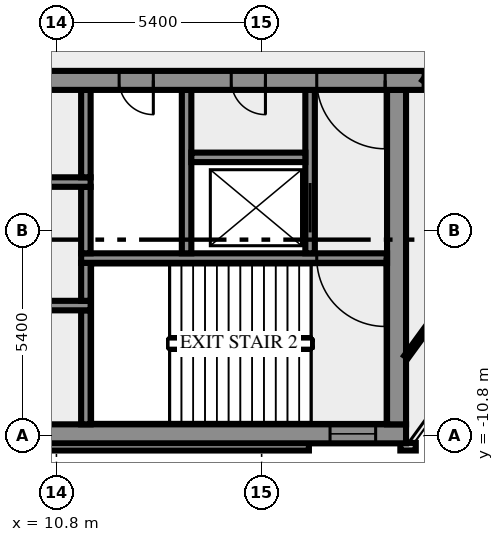
"""IFC4 building model, lengths in metres.
Left out: names, types, materials, properties, quantities, classifications, styles, units other than length and angle.
Written with IfcOpenShell. Run it as: python <this file> out.ifc"""

import sys

from ifc_helpers import new_model, si_unit, direction, frame, frame_2d, origin, place, context, subcontext, project, spatial, rectangle, extrude, element, fill, save


model = new_model("IFC4")
c1 = context("Model", 3, precision=1e-05, world=origin(), true_north=direction((0.0, 1.0)))
c2 = subcontext(c1, "Body", "Model", "MODEL_VIEW")
j1 = project(units=[si_unit("LENGTHUNIT", "METRE"), si_unit("PLANEANGLEUNIT", "RADIAN")], contexts=[c1])
p1 = place(None, origin())
s1 = spatial("IfcSite", under=j1, at=p1, CompositionType="ELEMENT")
p2 = place(p1, origin())
s2 = spatial("IfcBuilding", under=s1, at=p2, CompositionType="ELEMENT")
p3 = place(p2, frame((0.0, 0.0, 273.0)))
s3 = spatial("IfcBuildingStorey", under=s2, at=p3, CompositionType="ELEMENT", Elevation=273.0)
p4 = place(p3, frame((-17.444, -11.088, 0.0), z_axis=(0.0, 0.0, 1.0), x_axis=(1.0, 0.0, 0.0)))
e1 = element("IfcWall", 1, at=p4, inside=s3, PredefinedType="SOLIDWALL", context=c2, shape_type="SweptSolid", body=[
    extrude(rectangle(XDim=34.888, YDim=0.2, at=frame_2d((17.444, 0.0))), origin(), (0.0, 0.0, 1.0), 7.65),
])
p5 = place(p3, frame((19.85, -11.088, 0.0), z_axis=(0.0, 0.0, 1.0), x_axis=(1.0, 0.0, 0.0)))
e2 = element("IfcWall", 2, at=p5, inside=s3, PredefinedType="SOLIDWALL", context=c2, shape_type="SweptSolid", body=[
    extrude(rectangle(XDim=0.406, YDim=0.2, at=frame_2d((0.203, 0.0))), origin(), (0.0, 0.0, 1.0), 7.65),
])
p6 = place(p3, frame((-20.0, -10.75, 0.0), z_axis=(0.0, 0.0, 1.0), x_axis=(1.0, 0.0, 0.0)))
e3 = element("IfcWall", 3, at=p6, inside=s3, PredefinedType="SHEAR", context=c2, shape_type="SweptSolid", body=[
    extrude(rectangle(XDim=40.0, YDim=0.5, at=frame_2d((20.0, 0.0))), origin(), (0.0, 0.0, 1.0), 7.65),
])
p7 = place(p6, frame((0.8, 0.0, 1.0)))
e4 = element("IfcOpeningElement", 4, at=p7, cuts=e3, PredefinedType="OPENING", context=c2, shape_type="SweptSolid", body=[
    extrude(rectangle(XDim=1.2, YDim=1.2, at=frame_2d((0.6, 0.6))), frame((0.0, 0.26, 0.0), z_axis=(0.0, -1.0, 0.0), x_axis=(1.0, 0.0, 0.0)), (0.0, 0.0, 1.0), 0.52),
])
p8 = place(p6, frame((38.0, 0.0, 1.0)))
e5 = element("IfcOpeningElement", 5, at=p8, cuts=e3, PredefinedType="OPENING", context=c2, shape_type="SweptSolid", body=[
    extrude(rectangle(XDim=1.2, YDim=1.2, at=frame_2d((0.6, 0.6))), frame((0.0, 0.26, 0.0), z_axis=(0.0, -1.0, 0.0), x_axis=(1.0, 0.0, 0.0)), (0.0, 0.0, 1.0), 0.52),
])
p9 = place(p3, frame((11.575, -10.5, 0.0), z_axis=(0.0, 0.0, 1.0), x_axis=(0.0, 1.0, 0.0)))
e6 = element("IfcWall", 6, at=p9, inside=s3, PredefinedType="SHEAR", context=c2, shape_type="SweptSolid", body=[
    extrude(rectangle(XDim=3.0, YDim=0.25, at=frame_2d((1.5, 0.0))), origin(), (0.0, 0.0, 1.0), 7.65),
])
p10 = place(p3, frame((19.75, -10.5, 0.0), z_axis=(0.0, 0.0, 1.0), x_axis=(0.0, 1.0, 0.0)))
e7 = element("IfcWall", 7, at=p10, inside=s3, PredefinedType="SHEAR", context=c2, shape_type="SweptSolid", body=[
    extrude(rectangle(XDim=8.8, YDim=0.5, at=frame_2d((4.4, 0.0))), origin(), (0.0, 0.0, 1.0), 7.65),
])
p11 = place(p3, frame((11.7, -7.375, 0.0), z_axis=(0.0, 0.0, 1.0), x_axis=(-1.0, 0.0, 0.0)))
e8 = element("IfcWall", 8, at=p11, inside=s3, PredefinedType="SHEAR", context=c2, shape_type="SweptSolid", body=[
    extrude(rectangle(XDim=23.4, YDim=0.25, at=frame_2d((11.7, 0.0))), origin(), (0.0, 0.0, 1.0), 7.65),
])
p12 = place(p11, frame((14.5, 0.0, 0.0)))
e9 = element("IfcOpeningElement", 9, at=p12, cuts=e8, PredefinedType="OPENING", context=c2, shape_type="SweptSolid", body=[
    extrude(rectangle(XDim=0.9, YDim=2.1, at=frame_2d((0.45, 1.05))), frame((0.0, 0.135, 0.0), z_axis=(0.0, -1.0, 0.0), x_axis=(1.0, 0.0, 0.0)), (0.0, 0.0, 1.0), 0.27),
])
p13 = place(p11, frame((12.95, 0.0, 0.0)))
e10 = element("IfcOpeningElement", 10, at=p13, cuts=e8, PredefinedType="OPENING", context=c2, shape_type="SweptSolid", body=[
    extrude(rectangle(XDim=0.9, YDim=2.1, at=frame_2d((0.45, 1.05))), frame((0.0, 0.135, 0.0), z_axis=(0.0, -1.0, 0.0), x_axis=(1.0, 0.0, 0.0)), (0.0, 0.0, 1.0), 0.27),
])
p14 = place(p11, frame((10.95, 0.0, 0.0)))
e11 = element("IfcOpeningElement", 11, at=p14, cuts=e8, PredefinedType="OPENING", context=c2, shape_type="SweptSolid", body=[
    extrude(rectangle(XDim=0.9, YDim=2.1, at=frame_2d((0.45, 1.05))), frame((0.0, 0.135, 0.0), z_axis=(0.0, -1.0, 0.0), x_axis=(1.0, 0.0, 0.0)), (0.0, 0.0, 1.0), 0.27),
])
p15 = place(p11, frame((7.6, 0.0, 0.0)))
e12 = element("IfcOpeningElement", 12, at=p15, cuts=e8, PredefinedType="OPENING", context=c2, shape_type="SweptSolid", body=[
    extrude(rectangle(XDim=0.9, YDim=2.1, at=frame_2d((0.45, 1.05))), frame((0.0, 0.135, 0.0), z_axis=(0.0, -1.0, 0.0), x_axis=(1.0, 0.0, 0.0)), (0.0, 0.0, 1.0), 0.27),
])
p16 = place(p11, frame((2.338, 0.0, 0.0)))
e13 = element("IfcOpeningElement", 13, at=p16, cuts=e8, PredefinedType="OPENING", context=c2, shape_type="SweptSolid", body=[
    extrude(rectangle(XDim=0.9, YDim=2.1, at=frame_2d((0.45, 1.05))), frame((0.0, 0.135, 0.0), z_axis=(0.0, -1.0, 0.0), x_axis=(1.0, 0.0, 0.0)), (0.0, 0.0, 1.0), 0.27),
])
p17 = place(p3, frame((11.575, -7.25, 0.0), z_axis=(0.0, 0.0, 1.0), x_axis=(0.0, 1.0, 0.0)))
e14 = element("IfcWall", 14, at=p17, inside=s3, PredefinedType="SHEAR", context=c2, shape_type="SweptSolid", body=[
    extrude(rectangle(XDim=1.0, YDim=0.25, at=frame_2d((0.5, 0.0))), origin(), (0.0, 0.0, 1.0), 7.65),
])
p18 = place(p3, frame((19.5, -6.125, 0.0), z_axis=(0.0, 0.0, 1.0), x_axis=(-1.0, 0.0, 0.0)))
e15 = element("IfcWall", 15, at=p18, inside=s3, PredefinedType="SHEAR", context=c2, shape_type="SweptSolid", body=[
    extrude(rectangle(XDim=8.05, YDim=0.25, at=frame_2d((4.025, 0.0))), origin(), (0.0, 0.0, 1.0), 7.65),
])
p19 = place(p18, frame((0.05, 0.0, 0.0)))
e16 = element("IfcOpeningElement", 16, at=p19, cuts=e15, PredefinedType="OPENING", context=c2, shape_type="SweptSolid", body=[
    extrude(rectangle(XDim=1.8, YDim=2.1, at=frame_2d((0.9, 1.05))), frame((0.0, 0.135, 0.0), z_axis=(0.0, -1.0, 0.0), x_axis=(1.0, 0.0, 0.0)), (0.0, 0.0, 1.0), 0.27),
])
p20 = place(p3, frame((11.575, -6.0, 0.0), z_axis=(0.0, 0.0, 1.0), x_axis=(0.0, 1.0, 0.0)))
e17 = element("IfcWall", 17, at=p20, inside=s3, PredefinedType="SHEAR", context=c2, shape_type="SweptSolid", body=[
    extrude(rectangle(XDim=1.75, YDim=0.25, at=frame_2d((0.875, 0.0))), origin(), (0.0, 0.0, 1.0), 7.65),
])
p21 = place(p3, frame((14.225, -6.0, 0.0), z_axis=(0.0, 0.0, 1.0), x_axis=(0.0, 1.0, 0.0)))
e18 = element("IfcWall", 18, at=p21, inside=s3, PredefinedType="SHEAR", context=c2, shape_type="SweptSolid", body=[
    extrude(rectangle(XDim=4.3, YDim=0.25, at=frame_2d((2.15, 0.0))), origin(), (0.0, 0.0, 1.0), 7.65),
])
p22 = place(p3, frame((17.475, -6.0, 0.0), z_axis=(0.0, 0.0, 1.0), x_axis=(0.0, 1.0, 0.0)))
e19 = element("IfcWall", 19, at=p22, inside=s3, PredefinedType="SHEAR", context=c2, shape_type="SweptSolid", body=[
    extrude(rectangle(XDim=4.3, YDim=0.25, at=frame_2d((2.15, 0.0))), origin(), (0.0, 0.0, 1.0), 7.65),
])
p23 = place(p22, frame((0.55, 0.0, 0.0)))
e20 = element("IfcOpeningElement", 20, at=p23, cuts=e19, PredefinedType="OPENING", context=c2, shape_type="SweptSolid", body=[
    extrude(rectangle(XDim=1.3, YDim=2.1, at=frame_2d((0.65, 1.05))), frame((0.0, 0.135, 0.0), z_axis=(0.0, -1.0, 0.0), x_axis=(1.0, 0.0, 0.0)), (0.0, 0.0, 1.0), 0.27),
])
p24 = place(p3, frame((1.45, -4.125, 0.0), z_axis=(0.0, 0.0, 1.0), x_axis=(1.0, 0.0, 0.0)))
e21 = element("IfcWall", 21, at=p24, inside=s3, PredefinedType="SHEAR", context=c2, shape_type="SweptSolid", body=[
    extrude(rectangle(XDim=10.25, YDim=0.25, at=frame_2d((5.125, 0.0))), origin(), (0.0, 0.0, 1.0), 7.65),
])
p25 = place(p24, frame((0.7, 0.0, 0.0)))
e22 = element("IfcOpeningElement", 22, at=p25, cuts=e21, PredefinedType="OPENING", context=c2, shape_type="SweptSolid", body=[
    extrude(rectangle(XDim=1.3, YDim=2.1, at=frame_2d((0.65, 1.05))), frame((0.0, 0.135, 0.0), z_axis=(0.0, -1.0, 0.0), x_axis=(1.0, 0.0, 0.0)), (0.0, 0.0, 1.0), 0.27),
])
p26 = place(p3, frame((11.575, -4.0, 0.0), z_axis=(0.0, 0.0, 1.0), x_axis=(0.0, 1.0, 0.0)))
e23 = element("IfcWall", 23, at=p26, inside=s3, PredefinedType="SHEAR", context=c2, shape_type="SweptSolid", body=[
    extrude(rectangle(XDim=2.3, YDim=0.25, at=frame_2d((1.15, 0.0))), origin(), (0.0, 0.0, 1.0), 7.65),
])
p27 = place(p3, frame((14.35, -3.475, 0.0), z_axis=(0.0, 0.0, 1.0), x_axis=(1.0, 0.0, 0.0)))
e24 = element("IfcWall", 24, at=p27, inside=s3, PredefinedType="SHEAR", context=c2, shape_type="SweptSolid", body=[
    extrude(rectangle(XDim=3.0, YDim=0.25, at=frame_2d((1.5, 0.0))), origin(), (0.0, 0.0, 1.0), 7.65),
])
p28 = place(p3, frame((20.49, -1.45, 0.0), z_axis=(0.0, 0.0, 1.0), x_axis=(-1.0, 0.0, 0.0)))
e25 = element("IfcWall", 25, at=p28, inside=s3, PredefinedType="SHEAR", context=c2, shape_type="SweptSolid", body=[
    extrude(rectangle(XDim=40.98, YDim=0.5, at=frame_2d((20.49, 0.0))), origin(), (0.0, 0.0, 1.0), 7.65),
])
p29 = place(p28, frame((38.14, 0.0, 0.0)))
e26 = element("IfcOpeningElement", 26, at=p29, cuts=e25, PredefinedType="OPENING", context=c2, shape_type="SweptSolid", body=[
    extrude(rectangle(XDim=1.8, YDim=2.1, at=frame_2d((0.9, 1.05))), frame((0.0, 0.26, 0.0), z_axis=(0.0, -1.0, 0.0), x_axis=(1.0, 0.0, 0.0)), (0.0, 0.0, 1.0), 0.52),
])
p30 = place(p28, frame((36.728, 0.0, 0.0)))
e27 = element("IfcOpeningElement", 27, at=p30, cuts=e25, PredefinedType="OPENING", context=c2, shape_type="SweptSolid", body=[
    extrude(rectangle(XDim=0.8, YDim=2.1, at=frame_2d((0.4, 1.05))), frame((0.0, 0.26, 0.0), z_axis=(0.0, -1.0, 0.0), x_axis=(1.0, 0.0, 0.0)), (0.0, 0.0, 1.0), 0.52),
])
p31 = place(p28, frame((35.153, 0.0, 0.0)))
e28 = element("IfcOpeningElement", 28, at=p31, cuts=e25, PredefinedType="OPENING", context=c2, shape_type="SweptSolid", body=[
    extrude(rectangle(XDim=0.8, YDim=2.1, at=frame_2d((0.4, 1.05))), frame((0.0, 0.26, 0.0), z_axis=(0.0, -1.0, 0.0), x_axis=(1.0, 0.0, 0.0)), (0.0, 0.0, 1.0), 0.52),
])
p32 = place(p28, frame((32.94, 0.0, 0.0)))
e29 = element("IfcOpeningElement", 29, at=p32, cuts=e25, PredefinedType="OPENING", context=c2, shape_type="SweptSolid", body=[
    extrude(rectangle(XDim=0.9, YDim=2.1, at=frame_2d((0.45, 1.05))), frame((0.0, 0.26, 0.0), z_axis=(0.0, -1.0, 0.0), x_axis=(1.0, 0.0, 0.0)), (0.0, 0.0, 1.0), 0.52),
])
p33 = place(p28, frame((20.74, 0.0, 0.0)))
e30 = element("IfcOpeningElement", 30, at=p33, cuts=e25, PredefinedType="OPENING", context=c2, shape_type="SweptSolid", body=[
    extrude(rectangle(XDim=2.0, YDim=2.1, at=frame_2d((1.0, 1.05))), frame((0.0, 0.26, 0.0), z_axis=(0.0, -1.0, 0.0), x_axis=(1.0, 0.0, 0.0)), (0.0, 0.0, 1.0), 0.52),
])
p34 = place(p28, frame((14.903, 0.0, 0.0)))
e31 = element("IfcOpeningElement", 31, at=p34, cuts=e25, PredefinedType="OPENING", context=c2, shape_type="SweptSolid", body=[
    extrude(rectangle(XDim=0.9, YDim=2.1, at=frame_2d((0.45, 1.05))), frame((0.0, 0.26, 0.0), z_axis=(0.0, -1.0, 0.0), x_axis=(1.0, 0.0, 0.0)), (0.0, 0.0, 1.0), 0.52),
])
p35 = place(p28, frame((12.54, 0.0, 0.0)))
e32 = element("IfcOpeningElement", 32, at=p35, cuts=e25, PredefinedType="OPENING", context=c2, shape_type="SweptSolid", body=[
    extrude(rectangle(XDim=0.9, YDim=2.1, at=frame_2d((0.45, 1.05))), frame((0.0, 0.26, 0.0), z_axis=(0.0, -1.0, 0.0), x_axis=(1.0, 0.0, 0.0)), (0.0, 0.0, 1.0), 0.52),
])
p36 = place(p28, frame((9.877, 0.0, 0.0)))
e33 = element("IfcOpeningElement", 33, at=p36, cuts=e25, PredefinedType="OPENING", context=c2, shape_type="SweptSolid", body=[
    extrude(rectangle(XDim=0.9, YDim=2.1, at=frame_2d((0.45, 1.05))), frame((0.0, 0.26, 0.0), z_axis=(0.0, -1.0, 0.0), x_axis=(1.0, 0.0, 0.0)), (0.0, 0.0, 1.0), 0.52),
])
p37 = place(p28, frame((7.14, 0.0, 0.0)))
e34 = element("IfcOpeningElement", 34, at=p37, cuts=e25, PredefinedType="OPENING", context=c2, shape_type="SweptSolid", body=[
    extrude(rectangle(XDim=0.9, YDim=2.1, at=frame_2d((0.45, 1.05))), frame((0.0, 0.26, 0.0), z_axis=(0.0, -1.0, 0.0), x_axis=(1.0, 0.0, 0.0)), (0.0, 0.0, 1.0), 0.52),
])
p38 = place(p28, frame((4.19, 0.0, 0.0)))
e35 = element("IfcOpeningElement", 35, at=p38, cuts=e25, PredefinedType="OPENING", context=c2, shape_type="SweptSolid", body=[
    extrude(rectangle(XDim=0.9, YDim=2.1, at=frame_2d((0.45, 1.05))), frame((0.0, 0.26, 0.0), z_axis=(0.0, -1.0, 0.0), x_axis=(1.0, 0.0, 0.0)), (0.0, 0.0, 1.0), 0.52),
])
p39 = place(p28, frame((1.04, 0.0, 0.0)))
e36 = element("IfcOpeningElement", 36, at=p39, cuts=e25, PredefinedType="OPENING", context=c2, shape_type="SweptSolid", body=[
    extrude(rectangle(XDim=1.8, YDim=2.1, at=frame_2d((0.9, 1.05))), frame((0.0, 0.26, 0.0), z_axis=(0.0, -1.0, 0.0), x_axis=(1.0, 0.0, 0.0)), (0.0, 0.0, 1.0), 0.52),
])
p40 = place(p3, frame((33.12, 15.803, 0.0), z_axis=(0.0, 0.0, 1.0), x_axis=(-0.587781896694, -0.80901943235, 0.0)))
e37 = element("IfcWall", 37, at=p40, inside=s3, PredefinedType="SOLIDWALL", context=c2, shape_type="SweptSolid", body=[
    extrude(rectangle(XDim=21.417, YDim=0.25, at=frame_2d((10.708, 0.0))), origin(), (0.0, 0.0, 1.0), 7.65),
])
p41 = place(p40, frame((19.684, 0.0, 0.0)))
e38 = element("IfcOpeningElement", 38, at=p41, cuts=e37, PredefinedType="OPENING", context=c2, shape_type="SweptSolid", body=[
    extrude(rectangle(XDim=1.2, YDim=2.1, at=frame_2d((0.6, 1.05))), frame((0.0, 0.135, 0.0), z_axis=(0.0, -1.0, 0.0), x_axis=(1.0, 0.0, 0.0)), (0.0, 0.0, 1.0), 0.27),
])
p42 = place(p3, frame((20.0, -8.73, 0.0), z_axis=(0.0, 0.0, 1.0), x_axis=(0.588018712203, 0.808847324345, 0.0)))
e39 = element("IfcWall", 39, at=p42, inside=s3, PredefinedType="PARTITIONING", context=c2, shape_type="SweptSolid", body=[
    extrude(rectangle(XDim=1.708, YDim=0.12, at=frame_2d((0.854, 0.0))), origin(), (0.0, 0.0, 1.0), 7.65),
])
p43 = place(p8, origin())
e40 = element("IfcWindow", 40, at=p43, inside=s3, PartitioningType="SINGLE_PANEL", PredefinedType="WINDOW", context=c2, shape_type="SweptSolid", body=[
    extrude(rectangle(XDim=1.2, YDim=1.2, at=frame_2d((0.6, 0.6))), frame((0.0, 0.03, 0.0), z_axis=(0.0, -1.0, 0.0), x_axis=(1.0, 0.0, 0.0)), (0.0, 0.0, 1.0), 0.06),
])
fill(e5, e40)
p44 = place(p19, origin())
e41 = element("IfcDoor", 41, at=p44, inside=s3, OperationType="DOUBLE_DOOR_SINGLE_SWING", PredefinedType="DOOR", context=c2, shape_type="SweptSolid", body=[
    extrude(rectangle(XDim=1.8, YDim=2.1, at=frame_2d((0.9, 1.05))), frame((0.0, 0.025, 0.0), z_axis=(0.0, -1.0, 0.0), x_axis=(1.0, 0.0, 0.0)), (0.0, 0.0, 1.0), 0.05),
])
fill(e16, e41)
p45 = place(p23, origin())
e42 = element("IfcDoor", 42, at=p45, inside=s3, OperationType="DOUBLE_DOOR_SLIDING", PredefinedType="DOOR", context=c2, shape_type="SweptSolid", body=[
    extrude(rectangle(XDim=1.3, YDim=2.1, at=frame_2d((0.65, 1.05))), frame((0.0, 0.025, 0.0), z_axis=(0.0, -1.0, 0.0), x_axis=(1.0, 0.0, 0.0)), (0.0, 0.0, 1.0), 0.05),
])
fill(e20, e42)
p46 = place(p37, origin())
e43 = element("IfcDoor", 43, at=p46, inside=s3, OperationType="SINGLE_SWING_LEFT", PredefinedType="DOOR", context=c2, shape_type="SweptSolid", body=[
    extrude(rectangle(XDim=0.9, YDim=2.1, at=frame_2d((0.45, 1.05))), frame((0.0, 0.025, 0.0), z_axis=(0.0, -1.0, 0.0), x_axis=(1.0, 0.0, 0.0)), (0.0, 0.0, 1.0), 0.05),
])
fill(e34, e43)
p47 = place(p38, origin())
e44 = element("IfcDoor", 44, at=p47, inside=s3, OperationType="SINGLE_SWING_LEFT", PredefinedType="DOOR", context=c2, shape_type="SweptSolid", body=[
    extrude(rectangle(XDim=0.9, YDim=2.1, at=frame_2d((0.45, 1.05))), frame((0.0, 0.025, 0.0), z_axis=(0.0, -1.0, 0.0), x_axis=(1.0, 0.0, 0.0)), (0.0, 0.0, 1.0), 0.05),
])
fill(e35, e44)
p48 = place(p39, origin())
e45 = element("IfcDoor", 45, at=p48, inside=s3, OperationType="DOUBLE_DOOR_SINGLE_SWING", PredefinedType="DOOR", context=c2, shape_type="SweptSolid", body=[
    extrude(rectangle(XDim=1.8, YDim=2.1, at=frame_2d((0.9, 1.05))), frame((0.0, 0.025, 0.0), z_axis=(0.0, -1.0, 0.0), x_axis=(1.0, 0.0, 0.0)), (0.0, 0.0, 1.0), 0.05),
])
fill(e36, e45)
save(model, sys.argv[1])
